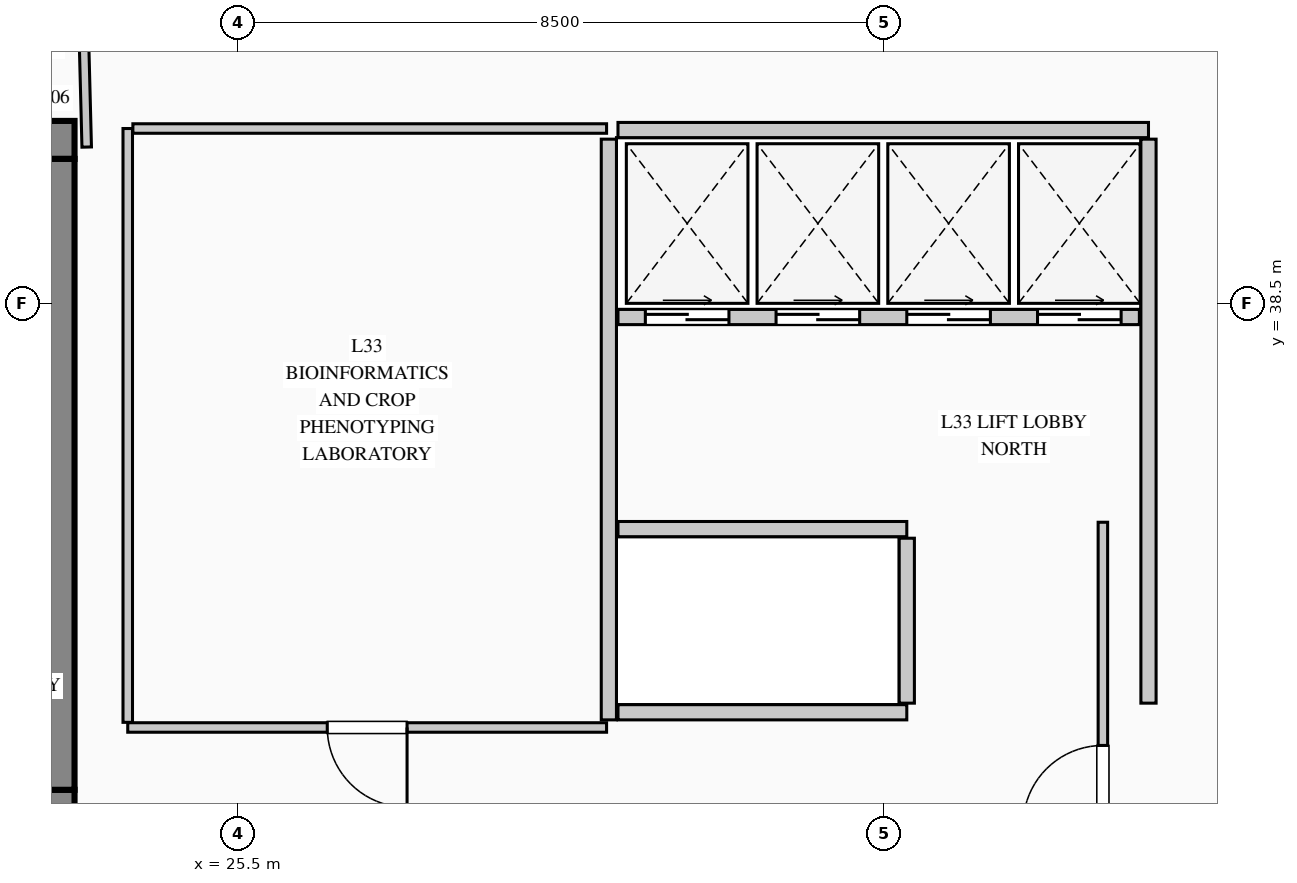
"""IFC4 building model, lengths in metres.
Left out: names, types, materials, properties, quantities, classifications, styles, units other than length and angle.
Written with IfcOpenShell. Run it as: python <this file> out.ifc"""

import sys

from ifc_helpers import new_model, si_unit, direction, frame, frame_2d, origin, place, context, subcontext, project, spatial, rectangle, extrude, element, fill, save


model = new_model("IFC4")
c1 = context("Model", 3, precision=1e-05, world=origin(), true_north=direction((0.0, 1.0)))
c2 = subcontext(c1, "Body", "Model", "MODEL_VIEW")
j1 = project(units=[si_unit("LENGTHUNIT", "METRE"), si_unit("PLANEANGLEUNIT", "RADIAN")], contexts=[c1])
p1 = place(None, origin())
s1 = spatial("IfcSite", under=j1, at=p1, CompositionType="ELEMENT")
p2 = place(p1, origin())
s2 = spatial("IfcBuilding", under=s1, at=p2, CompositionType="ELEMENT")
p3 = place(p2, frame((0.0, 0.0, 143.0)))
s3 = spatial("IfcBuildingStorey", under=s2, at=p3, CompositionType="ELEMENT", Elevation=143.0)
p4 = place(p3, frame((5.5, 40.65, 0.0), z_axis=(0.0, 0.0, 1.0), x_axis=(1.0, 0.0, 0.0)))
e1 = element("IfcWall", 1, at=p4, inside=s3, PredefinedType="SHEAR", context=c2, shape_type="SweptSolid", body=[
    extrude(rectangle(XDim=17.85, YDim=0.5, at=frame_2d((8.925, 0.0))), origin(), (0.0, 0.0, 1.0), 3.95),
])
p5 = place(p4, frame((15.945, 0.0, 0.0)))
e2 = element("IfcOpeningElement", 2, at=p5, cuts=e1, PredefinedType="OPENING", context=c2, shape_type="SweptSolid", body=[
    extrude(rectangle(XDim=1.18, YDim=2.25, at=frame_2d((0.59, 1.125))), frame((0.0, 0.26, 0.0), z_axis=(0.0, -1.0, 0.0), x_axis=(1.0, 0.0, 0.0)), (0.0, 0.0, 1.0), 0.52),
])
p6 = place(p3, frame((5.5, 31.85, 0.0), z_axis=(0.0, 0.0, 1.0), x_axis=(1.0, 0.0, 0.0)))
e3 = element("IfcWall", 3, at=p6, inside=s3, PredefinedType="SHEAR", context=c2, shape_type="SweptSolid", body=[
    extrude(rectangle(XDim=17.85, YDim=0.5, at=frame_2d((8.925, 0.0))), origin(), (0.0, 0.0, 1.0), 3.95),
])
p7 = place(p6, frame((3.15, 0.0, 0.0)))
e4 = element("IfcOpeningElement", 4, at=p7, cuts=e3, PredefinedType="OPENING", context=c2, shape_type="SweptSolid", body=[
    extrude(rectangle(XDim=1.2, YDim=2.2, at=frame_2d((0.6, 1.1))), frame((0.0, 0.26, 0.0), z_axis=(0.0, -1.0, 0.0), x_axis=(1.0, 0.0, 0.0)), (0.0, 0.0, 1.0), 0.52),
])
p8 = place(p6, frame((7.0, 0.0, 0.0)))
e5 = element("IfcOpeningElement", 5, at=p8, cuts=e3, PredefinedType="OPENING", context=c2, shape_type="SweptSolid", body=[
    extrude(rectangle(XDim=1.2, YDim=2.2, at=frame_2d((0.6, 1.1))), frame((0.0, 0.26, 0.0), z_axis=(0.0, -1.0, 0.0), x_axis=(1.0, 0.0, 0.0)), (0.0, 0.0, 1.0), 0.52),
])
p9 = place(p6, frame((8.85, 0.0, 0.0)))
e6 = element("IfcOpeningElement", 6, at=p9, cuts=e3, PredefinedType="OPENING", context=c2, shape_type="SweptSolid", body=[
    extrude(rectangle(XDim=1.15, YDim=2.2, at=frame_2d((0.575, 1.1))), frame((0.0, 0.26, 0.0), z_axis=(0.0, -1.0, 0.0), x_axis=(1.0, 0.0, 0.0)), (0.0, 0.0, 1.0), 0.52),
])
p10 = place(p6, frame((15.95, 0.0, 0.0)))
e7 = element("IfcOpeningElement", 7, at=p10, cuts=e3, PredefinedType="OPENING", context=c2, shape_type="SweptSolid", body=[
    extrude(rectangle(XDim=1.2, YDim=2.2, at=frame_2d((0.6, 1.1))), frame((0.0, 0.26, 0.0), z_axis=(0.0, -1.0, 0.0), x_axis=(1.0, 0.0, 0.0)), (0.0, 0.0, 1.0), 0.52),
])
p11 = place(p3, frame((23.1, 32.1, 0.0), z_axis=(0.0, 0.0, 1.0), x_axis=(0.0, 1.0, 0.0)))
e8 = element("IfcWall", 8, at=p11, inside=s3, PredefinedType="SHEAR", context=c2, shape_type="SweptSolid", body=[
    extrude(rectangle(XDim=8.3, YDim=0.5, at=frame_2d((4.15, 0.0))), origin(), (0.0, 0.0, 1.0), 3.95),
])
p12 = place(p3, frame((30.38, 33.02, 0.0), z_axis=(0.0, 0.0, 1.0), x_axis=(0.0, 1.0, 0.0)))
e9 = element("IfcWall", 9, at=p12, inside=s3, PredefinedType="PARTITIONING", context=c2, shape_type="SweptSolid", body=[
    extrude(rectangle(XDim=7.64, YDim=0.2, at=frame_2d((3.82, 0.0))), origin(), (0.0, 0.0, 1.0), 3.69),
])
p13 = place(p3, frame((30.5, 40.78, 0.0), z_axis=(0.0, 0.0, 1.0), x_axis=(1.0, 0.0, 0.0)))
e10 = element("IfcWall", 10, at=p13, inside=s3, PredefinedType="PARTITIONING", context=c2, shape_type="SweptSolid", body=[
    extrude(rectangle(XDim=6.98, YDim=0.2, at=frame_2d((3.49, 0.0))), origin(), (0.0, 0.0, 1.0), 3.69),
])
p14 = place(p3, frame((37.48, 33.24, 0.0), z_axis=(0.0, 0.0, 1.0), x_axis=(0.0, 1.0, 0.0)))
e11 = element("IfcWall", 11, at=p14, inside=s3, PredefinedType="PARTITIONING", context=c2, shape_type="SweptSolid", body=[
    extrude(rectangle(XDim=7.42, YDim=0.2, at=frame_2d((3.71, 0.0))), origin(), (0.0, 0.0, 1.0), 3.69),
])
p15 = place(p3, frame((30.5, 38.32, 0.0), z_axis=(0.0, 0.0, 1.0), x_axis=(1.0, 0.0, 0.0)))
e12 = element("IfcWall", 12, at=p15, inside=s3, PredefinedType="PARTITIONING", context=c2, shape_type="SweptSolid", body=[
    extrude(rectangle(XDim=6.86, YDim=0.2, at=frame_2d((3.43, 0.0))), origin(), (0.0, 0.0, 1.0), 3.69),
])
p16 = place(p15, frame((0.36, 0.0, 0.0)))
e13 = element("IfcOpeningElement", 13, at=p16, cuts=e12, PredefinedType="OPENING", context=c2, shape_type="SweptSolid", body=[
    extrude(rectangle(XDim=1.1, YDim=2.2, at=frame_2d((0.55, 1.1))), frame((0.0, 0.11, 0.0), z_axis=(0.0, -1.0, 0.0), x_axis=(1.0, 0.0, 0.0)), (0.0, 0.0, 1.0), 0.22),
])
p17 = place(p15, frame((2.08, 0.0, 0.0)))
e14 = element("IfcOpeningElement", 14, at=p17, cuts=e12, PredefinedType="OPENING", context=c2, shape_type="SweptSolid", body=[
    extrude(rectangle(XDim=1.1, YDim=2.2, at=frame_2d((0.55, 1.1))), frame((0.0, 0.11, 0.0), z_axis=(0.0, -1.0, 0.0), x_axis=(1.0, 0.0, 0.0)), (0.0, 0.0, 1.0), 0.22),
])
p18 = place(p15, frame((3.8, 0.0, 0.0)))
e15 = element("IfcOpeningElement", 15, at=p18, cuts=e12, PredefinedType="OPENING", context=c2, shape_type="SweptSolid", body=[
    extrude(rectangle(XDim=1.1, YDim=2.2, at=frame_2d((0.55, 1.1))), frame((0.0, 0.11, 0.0), z_axis=(0.0, -1.0, 0.0), x_axis=(1.0, 0.0, 0.0)), (0.0, 0.0, 1.0), 0.22),
])
p19 = place(p15, frame((5.52, 0.0, 0.0)))
e16 = element("IfcOpeningElement", 16, at=p19, cuts=e12, PredefinedType="OPENING", context=c2, shape_type="SweptSolid", body=[
    extrude(rectangle(XDim=1.1, YDim=2.2, at=frame_2d((0.55, 1.1))), frame((0.0, 0.11, 0.0), z_axis=(0.0, -1.0, 0.0), x_axis=(1.0, 0.0, 0.0)), (0.0, 0.0, 1.0), 0.22),
])
for number, where, z_axis, x_axis in (
    (17, (30.5, 35.53, 0.0), (0.0, 0.0, 1.0), (1.0, 0.0, 0.0)),
    (18, (30.5, 33.12, 0.0), (0.0, 0.0, 1.0), (1.0, 0.0, 0.0)),
):
    element("IfcWall", number, at=place(p3, frame(where, z_axis=z_axis, x_axis=x_axis)), inside=s3, PredefinedType="PARTITIONING", context=c2, shape_type="SweptSolid", body=[
        extrude(rectangle(XDim=3.8, YDim=0.2, at=frame_2d((1.9, 0.0))), origin(), (0.0, 0.0, 1.0), 3.69),
    ])
p20 = place(p3, frame((34.3, 33.24, 0.0), z_axis=(0.0, 0.0, 1.0), x_axis=(0.0, 1.0, 0.0)))
e19 = element("IfcWall", 19, at=p20, inside=s3, PredefinedType="PARTITIONING", context=c2, shape_type="SweptSolid", body=[
    extrude(rectangle(XDim=2.17, YDim=0.2, at=frame_2d((1.085, 0.0))), origin(), (0.0, 0.0, 1.0), 3.69),
])
p21 = place(p3, frame((30.35, 32.92, 0.0), z_axis=(0.0, 0.0, 1.0), x_axis=(-1.0, 0.0, 0.0)))
e20 = element("IfcWall", 20, at=p21, inside=s3, PredefinedType="PARTITIONING", context=c2, shape_type="SweptSolid", body=[
    extrude(rectangle(XDim=6.3, YDim=0.125, at=frame_2d((3.15, 0.0))), origin(), (0.0, 0.0, 1.0), 3.69),
])
p22 = place(p21, frame((2.625, 0.0, 0.0)))
e21 = element("IfcOpeningElement", 21, at=p22, cuts=e20, PredefinedType="OPENING", context=c2, shape_type="SweptSolid", body=[
    extrude(rectangle(XDim=1.05, YDim=2.15, at=frame_2d((0.525, 1.075))), frame((0.0, 0.073, 0.0), z_axis=(0.0, -1.0, 0.0), x_axis=(1.0, 0.0, 0.0)), (0.0, 0.0, 1.0), 0.145),
])
p23 = place(p3, frame((24.05, 32.988, 0.0), z_axis=(0.0, 0.0, 1.0), x_axis=(0.0, 1.0, 0.0)))
e22 = element("IfcWall", 22, at=p23, inside=s3, PredefinedType="PARTITIONING", context=c2, shape_type="SweptSolid", body=[
    extrude(rectangle(XDim=7.812, YDim=0.125, at=frame_2d((3.906, 0.0))), origin(), (0.0, 0.0, 1.0), 3.69),
])
p24 = place(p3, frame((24.117, 40.8, 0.0), z_axis=(0.0, 0.0, 1.0), x_axis=(1.0, 0.0, 0.0)))
e23 = element("IfcWall", 23, at=p24, inside=s3, PredefinedType="PARTITIONING", context=c2, shape_type="SweptSolid", body=[
    extrude(rectangle(XDim=6.233, YDim=0.125, at=frame_2d((3.116, 0.0))), origin(), (0.0, 0.0, 1.0), 3.69),
])
p25 = place(p3, frame((36.88, 28.698, 0.0), z_axis=(0.0, 0.0, 1.0), x_axis=(0.0, 1.0, 0.0)))
e24 = element("IfcWall", 24, at=p25, inside=s3, PredefinedType="PARTITIONING", context=c2, shape_type="SweptSolid", body=[
    extrude(rectangle(XDim=6.923, YDim=0.125, at=frame_2d((3.461, 0.0))), origin(), (0.0, 0.0, 1.0), 3.69),
])
p26 = place(p25, frame((2.936, 0.0, 0.0)))
e25 = element("IfcOpeningElement", 25, at=p26, cuts=e24, PredefinedType="OPENING", context=c2, shape_type="SweptSolid", body=[
    extrude(rectangle(XDim=1.05, YDim=2.15, at=frame_2d((0.525, 1.075))), frame((0.0, 0.073, 0.0), z_axis=(0.0, -1.0, 0.0), x_axis=(1.0, 0.0, 0.0)), (0.0, 0.0, 1.0), 0.145),
])
p27 = place(p3, frame((23.51, 40.556, 0.0), z_axis=(0.0, 0.0, 1.0), x_axis=(-0.02567646332, 0.999670305266, 0.0)))
e26 = element("IfcWall", 26, at=p27, inside=s3, PredefinedType="PARTITIONING", context=c2, shape_type="SweptSolid", body=[
    extrude(rectangle(XDim=2.71, YDim=0.125, at=frame_2d((1.355, 0.0))), origin(), (0.0, 0.0, 1.0), 3.69),
])
p28 = place(p16, origin())
e27 = element("IfcDoor", 27, at=p28, inside=s3, OperationType="DOUBLE_DOOR_SLIDING", PredefinedType="DOOR", context=c2, shape_type="SweptSolid", body=[
    extrude(rectangle(XDim=1.1, YDim=2.2, at=frame_2d((0.55, 1.1))), frame((0.0, 0.025, 0.0), z_axis=(0.0, -1.0, 0.0), x_axis=(1.0, 0.0, 0.0)), (0.0, 0.0, 1.0), 0.05),
])
fill(e13, e27)
p29 = place(p17, origin())
e28 = element("IfcDoor", 28, at=p29, inside=s3, OperationType="DOUBLE_DOOR_SLIDING", PredefinedType="DOOR", context=c2, shape_type="SweptSolid", body=[
    extrude(rectangle(XDim=1.1, YDim=2.2, at=frame_2d((0.55, 1.1))), frame((0.0, 0.025, 0.0), z_axis=(0.0, -1.0, 0.0), x_axis=(1.0, 0.0, 0.0)), (0.0, 0.0, 1.0), 0.05),
])
fill(e14, e28)
p30 = place(p18, origin())
e29 = element("IfcDoor", 29, at=p30, inside=s3, OperationType="DOUBLE_DOOR_SLIDING", PredefinedType="DOOR", context=c2, shape_type="SweptSolid", body=[
    extrude(rectangle(XDim=1.1, YDim=2.2, at=frame_2d((0.55, 1.1))), frame((0.0, 0.025, 0.0), z_axis=(0.0, -1.0, 0.0), x_axis=(1.0, 0.0, 0.0)), (0.0, 0.0, 1.0), 0.05),
])
fill(e15, e29)
p31 = place(p19, origin())
e30 = element("IfcDoor", 30, at=p31, inside=s3, OperationType="DOUBLE_DOOR_SLIDING", PredefinedType="DOOR", context=c2, shape_type="SweptSolid", body=[
    extrude(rectangle(XDim=1.1, YDim=2.2, at=frame_2d((0.55, 1.1))), frame((0.0, 0.025, 0.0), z_axis=(0.0, -1.0, 0.0), x_axis=(1.0, 0.0, 0.0)), (0.0, 0.0, 1.0), 0.05),
])
fill(e16, e30)
p32 = place(p22, origin())
e31 = element("IfcDoor", 31, at=p32, inside=s3, OperationType="SINGLE_SWING_LEFT", PredefinedType="DOOR", context=c2, shape_type="SweptSolid", body=[
    extrude(rectangle(XDim=1.05, YDim=2.15, at=frame_2d((0.525, 1.075))), frame((0.0, 0.025, 0.0), z_axis=(0.0, -1.0, 0.0), x_axis=(1.0, 0.0, 0.0)), (0.0, 0.0, 1.0), 0.05),
])
fill(e21, e31)
p33 = place(p26, origin())
e32 = element("IfcDoor", 32, at=p33, inside=s3, OperationType="SINGLE_SWING_LEFT", PredefinedType="DOOR", context=c2, shape_type="SweptSolid", body=[
    extrude(rectangle(XDim=1.05, YDim=2.15, at=frame_2d((0.525, 1.075))), frame((0.0, 0.025, 0.0), z_axis=(0.0, -1.0, 0.0), x_axis=(1.0, 0.0, 0.0)), (0.0, 0.0, 1.0), 0.05),
])
fill(e25, e32)
save(model, sys.argv[1])
